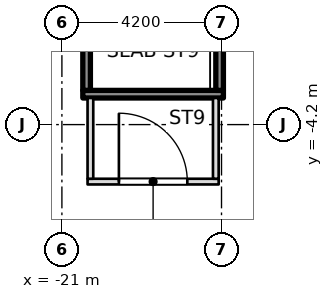
"""IFC4 building model, lengths in metres.
Left out: names, types, materials, properties, quantities, classifications, styles, units other than length and angle.
Written with IfcOpenShell. Run it as: python <this file> out.ifc"""

import sys

from ifc_helpers import new_model, si_unit, direction, frame, frame_2d, origin, place, context, subcontext, project, spatial, rectangle, extrude, element, fill, save


model = new_model("IFC4")
c1 = context("Model", 3, precision=1e-05, world=origin(), true_north=direction((0.0, 1.0)))
c2 = subcontext(c1, "Body", "Model", "MODEL_VIEW")
j1 = project(units=[si_unit("LENGTHUNIT", "METRE"), si_unit("PLANEANGLEUNIT", "RADIAN")], contexts=[c1])
p1 = place(None, origin())
s1 = spatial("IfcSite", under=j1, at=p1, CompositionType="ELEMENT")
p2 = place(p1, origin())
s2 = spatial("IfcBuilding", under=s1, at=p2, CompositionType="ELEMENT")
p3 = place(p2, frame((0.0, 0.0, -4.2)))
s3 = spatial("IfcBuildingStorey", under=s2, at=p3, CompositionType="ELEMENT", Elevation=-4.2)
p4 = place(p3, frame((-20.325, -5.7, 0.0), z_axis=(0.0, 0.0, 1.0), x_axis=(1.0, 0.0, 0.0)))
e1 = element("IfcWall", 1, at=p4, inside=s3, PredefinedType="PARTITIONING", context=c2, shape_type="SweptSolid", body=[
    extrude(rectangle(XDim=3.45, YDim=0.15, at=frame_2d((1.725, 0.0))), origin(), (0.0, 0.0, 1.0), 3.75),
])
p5 = place(p4, frame((0.825, 0.0, 0.0)))
e2 = element("IfcOpeningElement", 2, at=p5, cuts=e1, PredefinedType="OPENING", context=c2, shape_type="SweptSolid", body=[
    extrude(rectangle(XDim=1.8, YDim=2.1, at=frame_2d((0.9, 1.05))), frame((0.0, 0.085, 0.0), z_axis=(0.0, -1.0, 0.0), x_axis=(1.0, 0.0, 0.0)), (0.0, 0.0, 1.0), 0.17),
])
for number, where, z_axis, x_axis in (
    (3, (-20.25, -5.625, 0.0), (0.0, 0.0, 1.0), (0.0, 1.0, 0.0)),
    (4, (-16.95, -5.625, 0.0), (0.0, 0.0, 1.0), (0.0, 1.0, 0.0)),
):
    element("IfcWall", number, at=place(p3, frame(where, z_axis=z_axis, x_axis=x_axis)), inside=s3, PredefinedType="PARTITIONING", context=c2, shape_type="SweptSolid", body=[
        extrude(rectangle(XDim=2.125, YDim=0.15, at=frame_2d((1.062, 0.0))), origin(), (0.0, 0.0, 1.0), 3.75),
    ])
p6 = place(p3, frame((-20.45, -3.4, 0.0), z_axis=(0.0, 0.0, 1.0), x_axis=(1.0, 0.0, 0.0)))
e5 = element("IfcWall", 5, at=p6, inside=s3, PredefinedType="SOLIDWALL", context=c2, shape_type="SweptSolid", body=[
    extrude(rectangle(XDim=3.7, YDim=0.2, at=frame_2d((1.85, 0.0))), origin(), (0.0, 0.0, 1.0), 3.75),
])
p7 = place(p3, frame((-20.35, -3.3, 0.0), z_axis=(0.0, 0.0, 1.0), x_axis=(0.0, 1.0, 0.0)))
e6 = element("IfcWall", 6, at=p7, inside=s3, PredefinedType="SOLIDWALL", context=c2, shape_type="SweptSolid", body=[
    extrude(rectangle(XDim=6.6, YDim=0.2, at=frame_2d((3.3, 0.0))), origin(), (0.0, 0.0, 1.0), 3.75),
])
p8 = place(p3, frame((-16.85, -3.3, 0.0), z_axis=(0.0, 0.0, 1.0), x_axis=(0.0, 1.0, 0.0)))
e7 = element("IfcWall", 7, at=p8, inside=s3, PredefinedType="SOLIDWALL", context=c2, shape_type="SweptSolid", body=[
    extrude(rectangle(XDim=6.6, YDim=0.2, at=frame_2d((3.3, 0.0))), origin(), (0.0, 0.0, 1.0), 3.75),
])
p9 = place(p8, frame((5.1, 0.0, 0.0)))
e8 = element("IfcOpeningElement", 8, at=p9, cuts=e7, PredefinedType="OPENING", context=c2, shape_type="SweptSolid", body=[
    extrude(rectangle(XDim=1.2, YDim=2.1, at=frame_2d((0.6, 1.05))), frame((0.0, 0.11, 0.0), z_axis=(0.0, -1.0, 0.0), x_axis=(1.0, 0.0, 0.0)), (0.0, 0.0, 1.0), 0.22),
])
p10 = place(p5, origin())
e9 = element("IfcDoor", 9, at=p10, inside=s3, OperationType="DOUBLE_DOOR_SINGLE_SWING", PredefinedType="DOOR", context=c2, shape_type="SweptSolid", body=[
    extrude(rectangle(XDim=1.8, YDim=2.1, at=frame_2d((0.9, 1.05))), frame((0.0, 0.025, 0.0), z_axis=(0.0, -1.0, 0.0), x_axis=(1.0, 0.0, 0.0)), (0.0, 0.0, 1.0), 0.05),
])
fill(e2, e9)
save(model, sys.argv[1])
